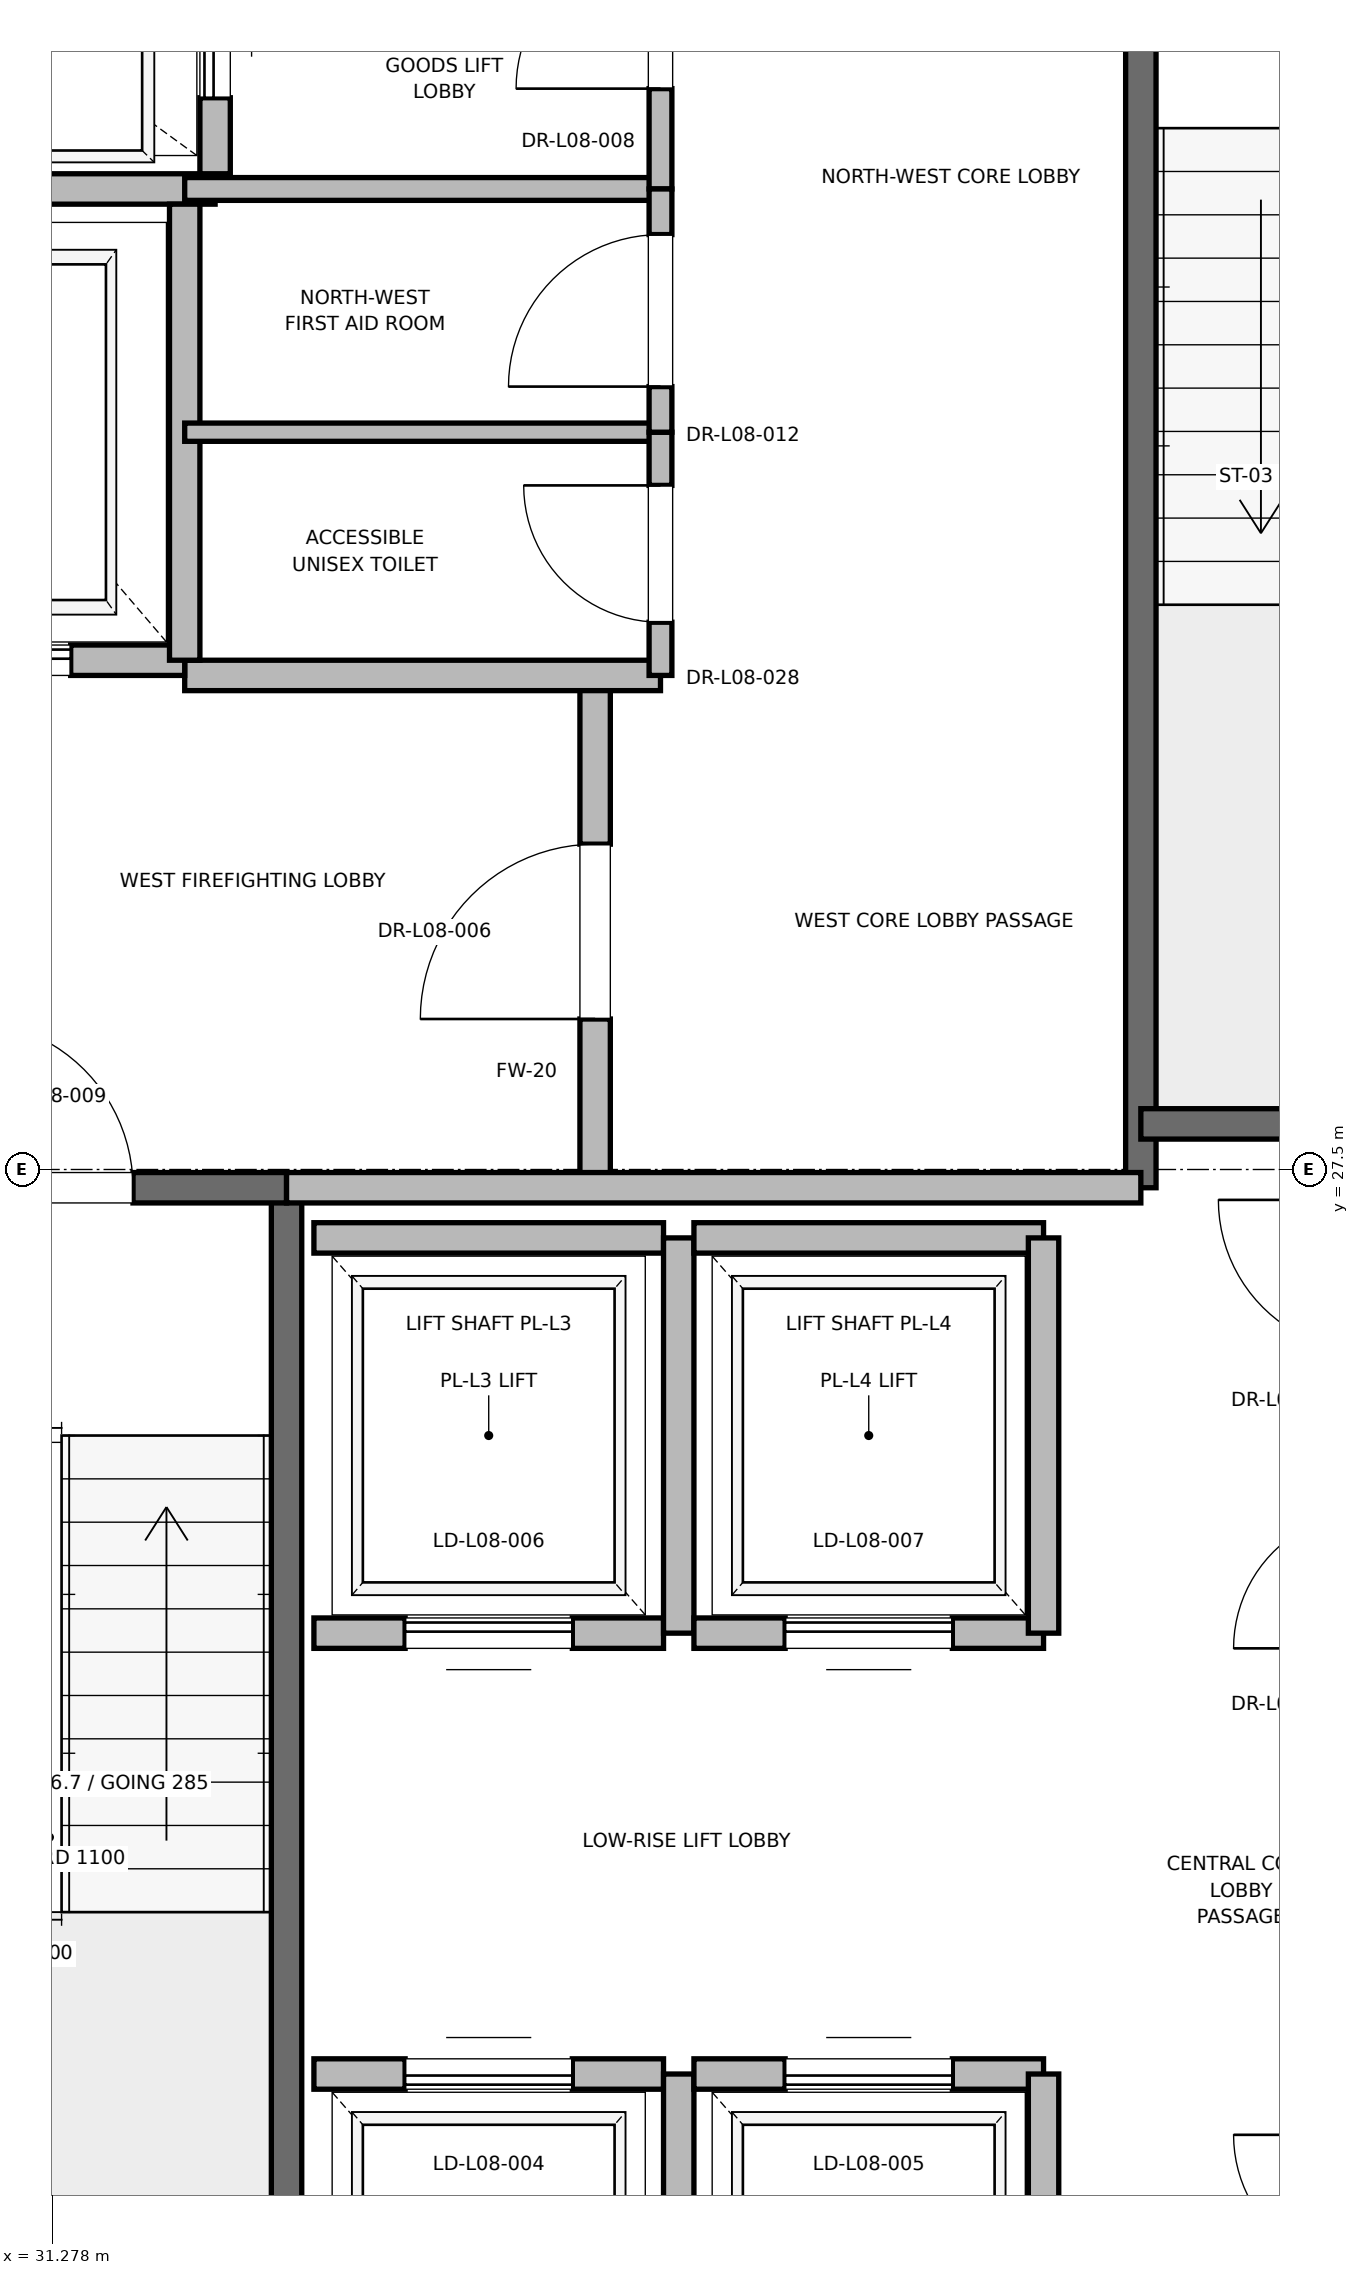
"""IFC4 building model, lengths in metres.
Left out: names, types, materials, properties, quantities, classifications, styles, units other than length and angle.
Written with IfcOpenShell. Run it as: python <this file> out.ifc"""

import sys

from ifc_helpers import new_model, si_unit, direction, frame, frame_2d, origin, place, context, subcontext, project, spatial, rectangle, extrude, element, fill, save


model = new_model("IFC4")
c1 = context("Model", 3, precision=1e-05, world=origin(), true_north=direction((0.0, 1.0)))
c2 = subcontext(c1, "Body", "Model", "MODEL_VIEW")
j1 = project(units=[si_unit("LENGTHUNIT", "METRE"), si_unit("PLANEANGLEUNIT", "RADIAN")], contexts=[c1])
p1 = place(None, origin())
s1 = spatial("IfcSite", under=j1, at=p1, CompositionType="ELEMENT")
p2 = place(p1, origin())
s2 = spatial("IfcBuilding", under=s1, at=p2, CompositionType="ELEMENT")
p3 = place(p2, frame((0.0, 0.0, 39.6)))
s3 = spatial("IfcBuildingStorey", under=s2, at=p3, CompositionType="ELEMENT", Elevation=39.6)
p4 = place(p3, frame((32.82, 18.6, 0.0), z_axis=(0.0, 0.0, 1.0), x_axis=(0.0, 1.0, 0.0)))
e1 = element("IfcWall", 1, at=p4, inside=s3, PredefinedType="SOLIDWALL", context=c2, shape_type="SweptSolid", body=[
    extrude(rectangle(XDim=8.78, YDim=0.2, at=frame_2d((4.39, 0.0))), origin(), (0.0, 0.0, 1.0), 3.76),
])
p5 = place(p3, frame((29.7, 27.38, 0.0), z_axis=(0.0, 0.0, 1.0), x_axis=(1.0, 0.0, 0.0)))
e2 = element("IfcWall", 2, at=p5, inside=s3, PredefinedType="SOLIDWALL", context=c2, shape_type="SweptSolid", body=[
    extrude(rectangle(XDim=3.12, YDim=0.2, at=frame_2d((1.56, 0.0))), origin(), (0.0, 0.0, 1.0), 3.76),
])
p6 = place(p5, frame((1.01, 0.0, 0.0)))
e3 = element("IfcOpeningElement", 3, at=p6, cuts=e2, PredefinedType="OPENING", context=c2, shape_type="SweptSolid", body=[
    extrude(rectangle(XDim=1.1, YDim=2.15, at=frame_2d((0.55, 1.075))), frame((0.0, 0.1, 0.0), z_axis=(0.0, -1.0, 0.0), x_axis=(1.0, 0.0, 0.0)), (0.0, 0.0, 1.0), 0.2),
])
p7 = place(p3, frame((38.44, 27.38, 0.0), z_axis=(0.0, 0.0, 1.0), x_axis=(0.0, 1.0, 0.0)))
e4 = element("IfcWall", 4, at=p7, inside=s3, PredefinedType="SOLIDWALL", context=c2, shape_type="SweptSolid", body=[
    extrude(rectangle(XDim=8.87, YDim=0.2, at=frame_2d((4.435, 0.0))), origin(), (0.0, 0.0, 1.0), 3.76),
])
p8 = place(p3, frame((38.44, 27.8, 0.0), z_axis=(0.0, 0.0, 1.0), x_axis=(1.0, 0.0, 0.0)))
e5 = element("IfcWall", 5, at=p8, inside=s3, PredefinedType="SOLIDWALL", context=c2, shape_type="SweptSolid", body=[
    extrude(rectangle(XDim=3.32, YDim=0.2, at=frame_2d((1.66, 0.0))), origin(), (0.0, 0.0, 1.0), 3.76),
])
p9 = place(p3, frame((34.85, 27.38, 0.0), z_axis=(0.0, 0.0, 1.0), x_axis=(0.0, 1.0, 0.0)))
e6 = element("IfcWall", 6, at=p9, inside=s3, PredefinedType="PARTITIONING", context=c2, shape_type="SweptSolid", body=[
    extrude(rectangle(XDim=3.37, YDim=0.2, at=frame_2d((1.685, 0.0))), origin(), (0.0, 0.0, 1.0), 3.76),
])
p10 = place(p9, frame((1.11, 0.0, 0.0)))
e7 = element("IfcOpeningElement", 7, at=p10, cuts=e6, PredefinedType="OPENING", context=c2, shape_type="SweptSolid", body=[
    extrude(rectangle(XDim=1.15, YDim=2.2, at=frame_2d((0.575, 1.1))), frame((0.0, 0.1, 0.0), z_axis=(0.0, -1.0, 0.0), x_axis=(1.0, 0.0, 0.0)), (0.0, 0.0, 1.0), 0.2),
])
p11 = place(p3, frame((32.82, 27.38, 0.0), z_axis=(0.0, 0.0, 1.0), x_axis=(1.0, 0.0, 0.0)))
e8 = element("IfcWall", 8, at=p11, inside=s3, PredefinedType="PARTITIONING", context=c2, shape_type="SweptSolid", body=[
    extrude(rectangle(XDim=5.62, YDim=0.2, at=frame_2d((2.81, 0.0))), origin(), (0.0, 0.0, 1.0), 3.76),
])
p12 = place(p3, frame((32.15, 30.75, 0.0), z_axis=(0.0, 0.0, 1.0), x_axis=(1.0, 0.0, 0.0)))
e9 = element("IfcWall", 9, at=p12, inside=s3, PredefinedType="PARTITIONING", context=c2, shape_type="SweptSolid", body=[
    extrude(rectangle(XDim=3.13, YDim=0.2, at=frame_2d((1.565, 0.0))), origin(), (0.0, 0.0, 1.0), 3.76),
])
p13 = place(p3, frame((29.55, 30.85, 0.0), z_axis=(0.0, 0.0, 1.0), x_axis=(1.0, 0.0, 0.0)))
e10 = element("IfcWall", 10, at=p13, inside=s3, PredefinedType="SOLIDWALL", context=c2, shape_type="SweptSolid", body=[
    extrude(rectangle(XDim=2.6, YDim=0.2, at=frame_2d((1.3, 0.0))), origin(), (0.0, 0.0, 1.0), 2.54),
])
p14 = place(p13, frame((0.75, 0.0, 0.0)))
e11 = element("IfcOpeningElement", 11, at=p14, cuts=e10, PredefinedType="OPENING", context=c2, shape_type="SweptSolid", body=[
    extrude(rectangle(XDim=1.1, YDim=2.2, at=frame_2d((0.55, 1.1))), frame((0.0, 0.1, 0.0), z_axis=(0.0, -1.0, 0.0), x_axis=(1.0, 0.0, 0.0)), (0.0, 0.0, 1.0), 0.2),
])
p15 = place(p3, frame((29.55, 33.95, 0.0), z_axis=(0.0, 0.0, 1.0), x_axis=(1.0, 0.0, 0.0)))
e12 = element("IfcWall", 12, at=p15, inside=s3, PredefinedType="SOLIDWALL", context=c2, shape_type="SweptSolid", body=[
    extrude(rectangle(XDim=2.8, YDim=0.2, at=frame_2d((1.4, 0.0))), origin(), (0.0, 0.0, 1.0), 3.76),
])
p16 = place(p3, frame((32.15, 30.85, 0.0), z_axis=(0.0, 0.0, 1.0), x_axis=(0.0, 1.0, 0.0)))
e13 = element("IfcWall", 13, at=p16, inside=s3, PredefinedType="SOLIDWALL", context=c2, shape_type="SweptSolid", body=[
    extrude(rectangle(XDim=3.0, YDim=0.2, at=frame_2d((1.5, 0.0))), origin(), (0.0, 0.0, 1.0), 3.76),
])
p17 = place(p3, frame((32.35, 34.05, 0.0), z_axis=(0.0, 0.0, 1.0), x_axis=(0.0, 1.0, 0.0)))
e14 = element("IfcWall", 14, at=p17, inside=s3, PredefinedType="SOLIDWALL", context=c2, shape_type="SweptSolid", body=[
    extrude(rectangle(XDim=2.1, YDim=0.2, at=frame_2d((1.05, 0.0))), origin(), (0.0, 0.0, 1.0), 3.76),
])
p18 = place(p17, frame((0.5, 0.0, 0.0)))
e15 = element("IfcOpeningElement", 15, at=p18, cuts=e14, PredefinedType="OPENING", context=c2, shape_type="SweptSolid", body=[
    extrude(rectangle(XDim=1.1, YDim=2.2, at=frame_2d((0.55, 1.1))), frame((0.0, 0.1, 0.0), z_axis=(0.0, -1.0, 0.0), x_axis=(1.0, 0.0, 0.0)), (0.0, 0.0, 1.0), 0.2),
])
p19 = place(p3, frame((35.3, 21.55, 0.0), z_axis=(0.0, 0.0, 1.0), x_axis=(-1.0, 0.0, 0.0)))
e16 = element("IfcWall", 16, at=p19, inside=s3, PredefinedType="SOLIDWALL", context=c2, shape_type="SweptSolid", body=[
    extrude(rectangle(XDim=2.3, YDim=0.2, at=frame_2d((1.15, 0.0))), origin(), (0.0, 0.0, 1.0), 3.76),
])
p20 = place(p19, frame((0.6, 0.0, 0.0)))
e17 = element("IfcOpeningElement", 17, at=p20, cuts=e16, PredefinedType="OPENING", context=c2, shape_type="SweptSolid", body=[
    extrude(rectangle(XDim=1.1, YDim=2.2, at=frame_2d((0.55, 1.1))), frame((0.0, 0.1, 0.0), z_axis=(0.0, -1.0, 0.0), x_axis=(1.0, 0.0, 0.0)), (0.0, 0.0, 1.0), 0.2),
])
p21 = place(p3, frame((35.4, 18.95, 0.0), z_axis=(0.0, 0.0, 1.0), x_axis=(0.0, 1.0, 0.0)))
e18 = element("IfcWall", 18, at=p21, inside=s3, PredefinedType="SOLIDWALL", context=c2, shape_type="SweptSolid", body=[
    extrude(rectangle(XDim=2.6, YDim=0.2, at=frame_2d((1.3, 0.0))), origin(), (0.0, 0.0, 1.0), 3.76),
])
p22 = place(p3, frame((37.8, 21.55, 0.0), z_axis=(0.0, 0.0, 1.0), x_axis=(-1.0, 0.0, 0.0)))
e19 = element("IfcWall", 19, at=p22, inside=s3, PredefinedType="SOLIDWALL", context=c2, shape_type="SweptSolid", body=[
    extrude(rectangle(XDim=2.3, YDim=0.2, at=frame_2d((1.15, 0.0))), origin(), (0.0, 0.0, 1.0), 3.76),
])
p23 = place(p22, frame((0.6, 0.0, 0.0)))
e20 = element("IfcOpeningElement", 20, at=p23, cuts=e19, PredefinedType="OPENING", context=c2, shape_type="SweptSolid", body=[
    extrude(rectangle(XDim=1.1, YDim=2.2, at=frame_2d((0.55, 1.1))), frame((0.0, 0.1, 0.0), z_axis=(0.0, -1.0, 0.0), x_axis=(1.0, 0.0, 0.0)), (0.0, 0.0, 1.0), 0.2),
])
p24 = place(p3, frame((37.8, 18.95, 0.0), z_axis=(0.0, 0.0, 1.0), x_axis=(0.0, 1.0, 0.0)))
e21 = element("IfcWall", 21, at=p24, inside=s3, PredefinedType="SOLIDWALL", context=c2, shape_type="SweptSolid", body=[
    extrude(rectangle(XDim=2.6, YDim=0.2, at=frame_2d((1.3, 0.0))), origin(), (0.0, 0.0, 1.0), 2.54),
])
p25 = place(p3, frame((33.0, 24.45, 0.0), z_axis=(0.0, 0.0, 1.0), x_axis=(1.0, 0.0, 0.0)))
e22 = element("IfcWall", 22, at=p25, inside=s3, PredefinedType="SOLIDWALL", context=c2, shape_type="SweptSolid", body=[
    extrude(rectangle(XDim=2.3, YDim=0.2, at=frame_2d((1.15, 0.0))), origin(), (0.0, 0.0, 1.0), 3.76),
])
p26 = place(p25, frame((0.6, 0.0, 0.0)))
e23 = element("IfcOpeningElement", 23, at=p26, cuts=e22, PredefinedType="OPENING", context=c2, shape_type="SweptSolid", body=[
    extrude(rectangle(XDim=1.1, YDim=2.2, at=frame_2d((0.55, 1.1))), frame((0.0, 0.1, 0.0), z_axis=(0.0, -1.0, 0.0), x_axis=(1.0, 0.0, 0.0)), (0.0, 0.0, 1.0), 0.2),
])
p27 = place(p3, frame((35.3, 27.05, 0.0), z_axis=(0.0, 0.0, 1.0), x_axis=(-1.0, 0.0, 0.0)))
e24 = element("IfcWall", 24, at=p27, inside=s3, PredefinedType="SOLIDWALL", context=c2, shape_type="SweptSolid", body=[
    extrude(rectangle(XDim=2.3, YDim=0.2, at=frame_2d((1.15, 0.0))), origin(), (0.0, 0.0, 1.0), 3.76),
])
p28 = place(p3, frame((35.4, 24.45, 0.0), z_axis=(0.0, 0.0, 1.0), x_axis=(0.0, 1.0, 0.0)))
e25 = element("IfcWall", 25, at=p28, inside=s3, PredefinedType="SOLIDWALL", context=c2, shape_type="SweptSolid", body=[
    extrude(rectangle(XDim=2.6, YDim=0.2, at=frame_2d((1.3, 0.0))), origin(), (0.0, 0.0, 1.0), 3.76),
])
p29 = place(p3, frame((35.5, 24.45, 0.0), z_axis=(0.0, 0.0, 1.0), x_axis=(1.0, 0.0, 0.0)))
e26 = element("IfcWall", 26, at=p29, inside=s3, PredefinedType="SOLIDWALL", context=c2, shape_type="SweptSolid", body=[
    extrude(rectangle(XDim=2.3, YDim=0.2, at=frame_2d((1.15, 0.0))), origin(), (0.0, 0.0, 1.0), 3.76),
])
p30 = place(p29, frame((0.6, 0.0, 0.0)))
e27 = element("IfcOpeningElement", 27, at=p30, cuts=e26, PredefinedType="OPENING", context=c2, shape_type="SweptSolid", body=[
    extrude(rectangle(XDim=1.1, YDim=2.2, at=frame_2d((0.55, 1.1))), frame((0.0, 0.1, 0.0), z_axis=(0.0, -1.0, 0.0), x_axis=(1.0, 0.0, 0.0)), (0.0, 0.0, 1.0), 0.2),
])
p31 = place(p3, frame((37.8, 27.05, 0.0), z_axis=(0.0, 0.0, 1.0), x_axis=(-1.0, 0.0, 0.0)))
e28 = element("IfcWall", 28, at=p31, inside=s3, PredefinedType="SOLIDWALL", context=c2, shape_type="SweptSolid", body=[
    extrude(rectangle(XDim=2.3, YDim=0.2, at=frame_2d((1.15, 0.0))), origin(), (0.0, 0.0, 1.0), 3.76),
])
p32 = place(p3, frame((37.8, 24.45, 0.0), z_axis=(0.0, 0.0, 1.0), x_axis=(0.0, 1.0, 0.0)))
e29 = element("IfcWall", 29, at=p32, inside=s3, PredefinedType="SOLIDWALL", context=c2, shape_type="SweptSolid", body=[
    extrude(rectangle(XDim=2.6, YDim=0.2, at=frame_2d((1.3, 0.0))), origin(), (0.0, 0.0, 1.0), 3.76),
])
p33 = place(p3, frame((32.15, 33.95, 0.0), z_axis=(0.0, 0.0, 1.0), x_axis=(1.0, 0.0, 0.0)))
e30 = element("IfcWall", 30, at=p33, inside=s3, PredefinedType="PARTITIONING", context=c2, shape_type="SweptSolid", body=[
    extrude(rectangle(XDim=3.13, YDim=0.15, at=frame_2d((1.565, 0.0))), origin(), (0.0, 0.0, 1.0), 2.85),
])
p34 = place(p3, frame((35.28, 33.95, 0.0), z_axis=(0.0, 0.0, 1.0), x_axis=(0.0, 1.0, 0.0)))
e31 = element("IfcWall", 31, at=p34, inside=s3, PredefinedType="PARTITIONING", context=c2, shape_type="SweptSolid", body=[
    extrude(rectangle(XDim=2.27, YDim=0.15, at=frame_2d((1.135, 0.0))), origin(), (0.0, 0.0, 1.0), 2.54),
])
p35 = place(p34, frame((0.66, 0.0, 0.0)))
e32 = element("IfcOpeningElement", 32, at=p35, cuts=e31, PredefinedType="OPENING", context=c2, shape_type="SweptSolid", body=[
    extrude(rectangle(XDim=0.95, YDim=2.15, at=frame_2d((0.475, 1.075))), frame((0.0, 0.075, 0.0), z_axis=(0.0, -1.0, 0.0), x_axis=(1.0, 0.0, 0.0)), (0.0, 0.0, 1.0), 0.15),
])
p36 = place(p3, frame((32.15, 32.35, 0.0), z_axis=(0.0, 0.0, 1.0), x_axis=(1.0, 0.0, 0.0)))
e33 = element("IfcWall", 33, at=p36, inside=s3, PredefinedType="PARTITIONING", context=c2, shape_type="SweptSolid", body=[
    extrude(rectangle(XDim=3.13, YDim=0.12, at=frame_2d((1.565, 0.0))), origin(), (0.0, 0.0, 1.0), 2.85),
])
p37 = place(p3, frame((35.28, 30.75, 0.0), z_axis=(0.0, 0.0, 1.0), x_axis=(0.0, 1.0, 0.0)))
e34 = element("IfcWall", 34, at=p37, inside=s3, PredefinedType="PARTITIONING", context=c2, shape_type="SweptSolid", body=[
    extrude(rectangle(XDim=1.6, YDim=0.15, at=frame_2d((0.8, 0.0))), origin(), (0.0, 0.0, 1.0), 2.85),
])
p38 = place(p37, frame((0.35, 0.0, 0.0)))
e35 = element("IfcOpeningElement", 35, at=p38, cuts=e34, PredefinedType="OPENING", context=c2, shape_type="SweptSolid", body=[
    extrude(rectangle(XDim=0.9, YDim=2.1, at=frame_2d((0.45, 1.05))), frame((0.0, 0.075, 0.0), z_axis=(0.0, -1.0, 0.0), x_axis=(1.0, 0.0, 0.0)), (0.0, 0.0, 1.0), 0.15),
])
p39 = place(p3, frame((35.28, 32.35, 0.0), z_axis=(0.0, 0.0, 1.0), x_axis=(0.0, 1.0, 0.0)))
e36 = element("IfcWall", 36, at=p39, inside=s3, PredefinedType="PARTITIONING", context=c2, shape_type="SweptSolid", body=[
    extrude(rectangle(XDim=1.6, YDim=0.15, at=frame_2d((0.8, 0.0))), origin(), (0.0, 0.0, 1.0), 2.85),
])
p40 = place(p39, frame((0.3, 0.0, 0.0)))
e37 = element("IfcOpeningElement", 37, at=p40, cuts=e36, PredefinedType="OPENING", context=c2, shape_type="SweptSolid", body=[
    extrude(rectangle(XDim=1.0, YDim=2.15, at=frame_2d((0.5, 1.075))), frame((0.0, 0.075, 0.0), z_axis=(0.0, -1.0, 0.0), x_axis=(1.0, 0.0, 0.0)), (0.0, 0.0, 1.0), 0.15),
])
p41 = place(p6, origin())
e38 = element("IfcDoor", 38, at=p41, inside=s3, OperationType="SINGLE_SWING_LEFT", PredefinedType="DOOR", context=c2, shape_type="SweptSolid", body=[
    extrude(rectangle(XDim=1.1, YDim=2.15, at=frame_2d((0.55, 1.075))), frame((0.0, 0.025, 0.0), z_axis=(0.0, -1.0, 0.0), x_axis=(1.0, 0.0, 0.0)), (0.0, 0.0, 1.0), 0.05),
])
fill(e3, e38)
p42 = place(p10, origin())
e39 = element("IfcDoor", 39, at=p42, inside=s3, OperationType="SINGLE_SWING_LEFT", PredefinedType="DOOR", context=c2, shape_type="SweptSolid", body=[
    extrude(rectangle(XDim=1.15, YDim=2.2, at=frame_2d((0.575, 1.1))), frame((0.0, 0.025, 0.0), z_axis=(0.0, -1.0, 0.0), x_axis=(1.0, 0.0, 0.0)), (0.0, 0.0, 1.0), 0.05),
])
fill(e7, e39)
p43 = place(p14, origin())
e40 = element("IfcDoor", 40, at=p43, inside=s3, OperationType="SLIDING_TO_RIGHT", PredefinedType="DOOR", context=c2, shape_type="SweptSolid", body=[
    extrude(rectangle(XDim=1.1, YDim=2.2, at=frame_2d((0.55, 1.1))), frame((0.0, 0.025, 0.0), z_axis=(0.0, -1.0, 0.0), x_axis=(1.0, 0.0, 0.0)), (0.0, 0.0, 1.0), 0.05),
])
fill(e11, e40)
p44 = place(p18, origin())
e41 = element("IfcDoor", 41, at=p44, inside=s3, OperationType="SLIDING_TO_RIGHT", PredefinedType="DOOR", context=c2, shape_type="SweptSolid", body=[
    extrude(rectangle(XDim=1.1, YDim=2.2, at=frame_2d((0.55, 1.1))), frame((0.0, 0.025, 0.0), z_axis=(0.0, -1.0, 0.0), x_axis=(1.0, 0.0, 0.0)), (0.0, 0.0, 1.0), 0.05),
])
fill(e15, e41)
p45 = place(p20, origin())
e42 = element("IfcDoor", 42, at=p45, inside=s3, OperationType="SLIDING_TO_RIGHT", PredefinedType="DOOR", context=c2, shape_type="SweptSolid", body=[
    extrude(rectangle(XDim=1.1, YDim=2.2, at=frame_2d((0.55, 1.1))), frame((0.0, 0.025, 0.0), z_axis=(0.0, -1.0, 0.0), x_axis=(1.0, 0.0, 0.0)), (0.0, 0.0, 1.0), 0.05),
])
fill(e17, e42)
p46 = place(p23, origin())
e43 = element("IfcDoor", 43, at=p46, inside=s3, OperationType="SLIDING_TO_RIGHT", PredefinedType="DOOR", context=c2, shape_type="SweptSolid", body=[
    extrude(rectangle(XDim=1.1, YDim=2.2, at=frame_2d((0.55, 1.1))), frame((0.0, 0.025, 0.0), z_axis=(0.0, -1.0, 0.0), x_axis=(1.0, 0.0, 0.0)), (0.0, 0.0, 1.0), 0.05),
])
fill(e20, e43)
p47 = place(p26, origin())
e44 = element("IfcDoor", 44, at=p47, inside=s3, OperationType="SLIDING_TO_RIGHT", PredefinedType="DOOR", context=c2, shape_type="SweptSolid", body=[
    extrude(rectangle(XDim=1.1, YDim=2.2, at=frame_2d((0.55, 1.1))), frame((0.0, 0.025, 0.0), z_axis=(0.0, -1.0, 0.0), x_axis=(1.0, 0.0, 0.0)), (0.0, 0.0, 1.0), 0.05),
])
fill(e23, e44)
p48 = place(p30, origin())
e45 = element("IfcDoor", 45, at=p48, inside=s3, OperationType="SLIDING_TO_RIGHT", PredefinedType="DOOR", context=c2, shape_type="SweptSolid", body=[
    extrude(rectangle(XDim=1.1, YDim=2.2, at=frame_2d((0.55, 1.1))), frame((0.0, 0.025, 0.0), z_axis=(0.0, -1.0, 0.0), x_axis=(1.0, 0.0, 0.0)), (0.0, 0.0, 1.0), 0.05),
])
fill(e27, e45)
p49 = place(p35, origin())
e46 = element("IfcDoor", 46, at=p49, inside=s3, OperationType="SINGLE_SWING_LEFT", PredefinedType="DOOR", context=c2, shape_type="SweptSolid", body=[
    extrude(rectangle(XDim=0.95, YDim=2.15, at=frame_2d((0.475, 1.075))), frame((0.0, 0.025, 0.0), z_axis=(0.0, -1.0, 0.0), x_axis=(1.0, 0.0, 0.0)), (0.0, 0.0, 1.0), 0.05),
])
fill(e32, e46)
p50 = place(p38, origin())
e47 = element("IfcDoor", 47, at=p50, inside=s3, OperationType="SINGLE_SWING_RIGHT", PredefinedType="DOOR", context=c2, shape_type="SweptSolid", body=[
    extrude(rectangle(XDim=0.9, YDim=2.1, at=frame_2d((0.45, 1.05))), frame((0.0, 0.025, 0.0), z_axis=(0.0, -1.0, 0.0), x_axis=(1.0, 0.0, 0.0)), (0.0, 0.0, 1.0), 0.05),
])
fill(e35, e47)
p51 = place(p40, origin())
e48 = element("IfcDoor", 48, at=p51, inside=s3, OperationType="SINGLE_SWING_LEFT", PredefinedType="DOOR", context=c2, shape_type="SweptSolid", body=[
    extrude(rectangle(XDim=1.0, YDim=2.15, at=frame_2d((0.5, 1.075))), frame((0.0, 0.025, 0.0), z_axis=(0.0, -1.0, 0.0), x_axis=(1.0, 0.0, 0.0)), (0.0, 0.0, 1.0), 0.05),
])
fill(e37, e48)
save(model, sys.argv[1])
